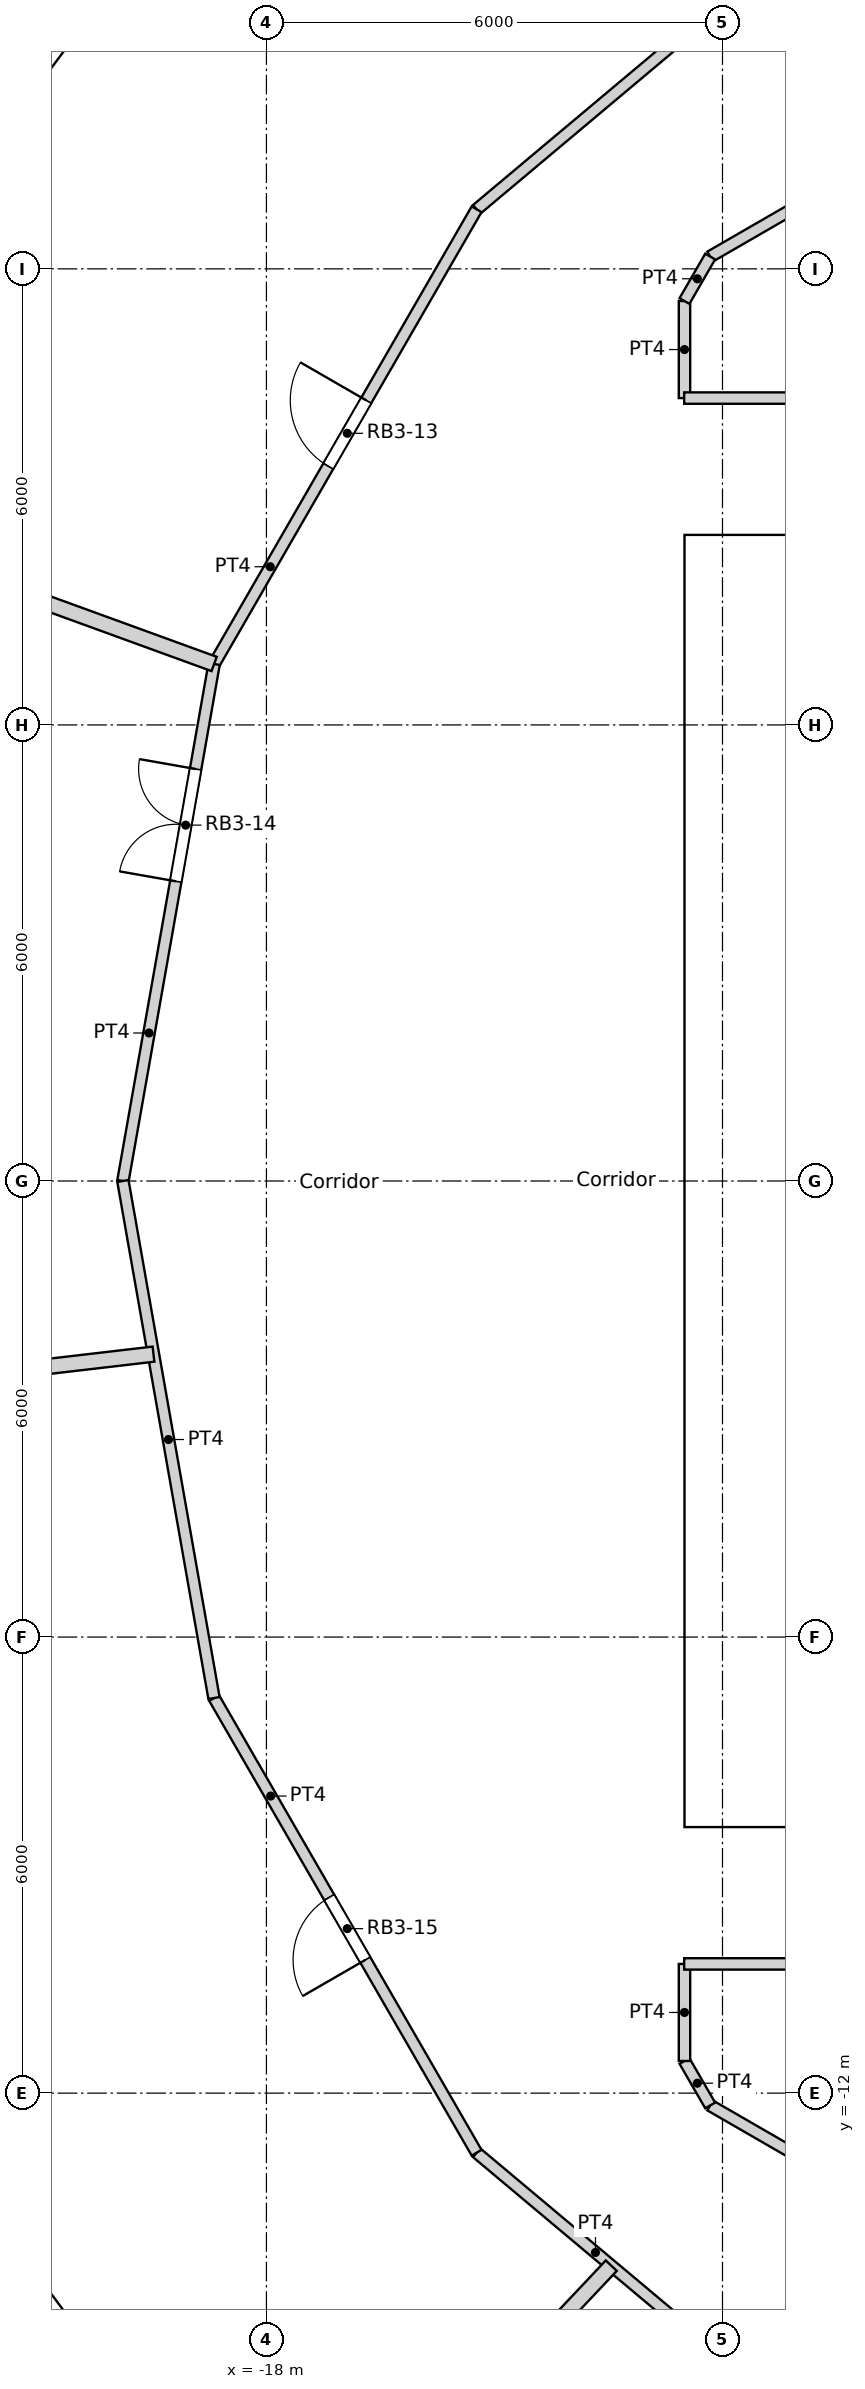
"""IFC4 building model, lengths in metres.
Left out: names, types, materials, properties, quantities, classifications, styles, units other than length and angle.
Written with IfcOpenShell. Run it as: python <this file> out.ifc"""

import sys

from ifc_helpers import new_model, si_unit, direction, frame, frame_2d, origin, origin_2d, place, context, subcontext, project, spatial, rectangle, circle, extrude, element, fill, save


model = new_model("IFC4")
c1 = context("Model", 3, precision=1e-05, world=origin(), true_north=direction((0.0, 1.0)))
c2 = subcontext(c1, "Body", "Model", "MODEL_VIEW")
j1 = project(units=[si_unit("LENGTHUNIT", "METRE"), si_unit("PLANEANGLEUNIT", "RADIAN")], contexts=[c1])
p1 = place(None, origin())
s1 = spatial("IfcSite", under=j1, at=p1, CompositionType="ELEMENT")
p2 = place(p1, origin())
s2 = spatial("IfcBuilding", under=s1, at=p2, CompositionType="ELEMENT")
p3 = place(p2, frame((0.0, 0.0, 147.6)))
s3 = spatial("IfcBuildingStorey", under=s2, at=p3, CompositionType="ELEMENT", Elevation=147.6)
for number, where, z_axis, x_axis in (
    (1, (-20.509, 13.489, 0.0), (0.0, 0.0, 1.0), (1.0, 0.0, 0.0)),
    (2, (-20.509, -13.489, 0.0), (0.0, 0.0, 1.0), (1.0, 0.0, 0.0)),
):
    element("IfcColumn", number, at=place(p3, frame(where, z_axis=z_axis, x_axis=x_axis)), inside=s3, PredefinedType="COLUMN", context=c2, shape_type="SweptSolid", body=[
        extrude(circle(Radius=0.6, at=origin_2d()), origin(), (0.0, 0.0, 1.0), 3.6),
    ])
for number, where, z_axis, x_axis in (
    (3, (-13.798, 12.802, 0.0), (0.0, 0.0, 1.0), (1.0, 0.0, 0.0)),
    (4, (-16.958, 8.167, 0.0), (0.0, 0.0, 1.0), (1.0, 0.0, 0.0)),
    (5, (-18.612, 2.805, 0.0), (0.0, 0.0, 1.0), (1.0, 0.0, 0.0)),
    (6, (-18.612, -2.805, 0.0), (0.0, 0.0, 1.0), (1.0, 0.0, 0.0)),
    (7, (-16.958, -8.167, 0.0), (0.0, 0.0, 1.0), (1.0, 0.0, 0.0)),
    (8, (-13.798, -12.802, 0.0), (0.0, 0.0, 1.0), (1.0, 0.0, 0.0)),
):
    element("IfcColumn", number, at=place(p3, frame(where, z_axis=z_axis, x_axis=x_axis)), inside=s3, PredefinedType="COLUMN", context=c2, shape_type="SweptSolid", body=[
        extrude(circle(Radius=0.65, at=origin_2d()), origin(), (0.0, 0.0, 1.0), 3.6),
    ])
p4 = place(p3, frame((-20.103, 16.836, -0.3), z_axis=(0.0, 0.0, 1.0), x_axis=(-0.597183717734, -0.802104486506, 0.0)))
e9 = element("IfcWall", 9, at=p4, inside=s3, PredefinedType="ELEMENTEDWALL", context=c2, shape_type="SweptSolid", body=[
    extrude(rectangle(XDim=3.0, YDim=1.45, at=frame_2d((1.5, 0.0))), origin(), (0.0, 0.0, 1.0), 3.6),
])
p5 = place(p4, frame((1.5, 0.0, 1.85)))
e10 = element("IfcOpeningElement", 10, at=p5, cuts=e9, PredefinedType="OPENING", context=c2, shape_type="SweptSolid", body=[
    extrude(circle(Radius=0.9, at=origin_2d()), frame((0.0, 0.735, 0.0), z_axis=(0.0, -1.0, 0.0), x_axis=(1.0, 0.0, 0.0)), (0.0, 0.0, 1.0), 1.47),
])
p6 = place(p3, frame((-21.428, -14.094, 0.0), z_axis=(0.0, 0.0, 1.0), x_axis=(0.597197580538, -0.80209416517, 0.0)))
e11 = element("IfcWall", 11, at=p6, inside=s3, PredefinedType="SOLIDWALL", context=c2, shape_type="SweptSolid", body=[
    extrude(rectangle(XDim=2.973, YDim=0.3, at=frame_2d((1.486, 0.0))), origin(), (0.0, 0.0, 1.0), 3.3),
])
p7 = place(p6, frame((1.486, 0.0, 1.55)))
e12 = element("IfcOpeningElement", 12, at=p7, cuts=e11, PredefinedType="OPENING", context=c2, shape_type="SweptSolid", body=[
    extrude(circle(Radius=0.9, at=origin_2d()), frame((0.0, 0.16, 0.0), z_axis=(0.0, -1.0, 0.0), x_axis=(1.0, 0.0, 0.0)), (0.0, 0.0, 1.0), 0.32),
])
p8 = place(p3, frame((-12.5, -8.05, 0.0), z_axis=(0.0, 0.0, 1.0), x_axis=(1.0, 0.0, 0.0)))
e13 = element("IfcWall", 13, at=p8, inside=s3, PredefinedType="SOLIDWALL", context=c2, shape_type="SweptSolid", body=[
    extrude(rectangle(XDim=25.0, YDim=0.9, at=frame_2d((12.5, 0.0))), origin(), (0.0, 0.0, 1.0), 3.6),
])
p9 = place(p8, frame((13.4, 0.0, 0.0)))
e14 = element("IfcOpeningElement", 14, at=p9, cuts=e13, PredefinedType="OPENING", context=c2, shape_type="SweptSolid", body=[
    extrude(rectangle(XDim=1.0, YDim=2.1, at=frame_2d((0.5, 1.05))), frame((0.0, 0.45, 0.0), z_axis=(0.0, -1.0, 0.0), x_axis=(1.0, 0.0, 0.0)), (0.0, 0.0, 1.0), 0.9),
])
p10 = place(p8, frame((8.3, 0.0, 0.0)))
e15 = element("IfcOpeningElement", 15, at=p10, cuts=e13, PredefinedType="OPENING", context=c2, shape_type="SweptSolid", body=[
    extrude(rectangle(XDim=1.8, YDim=2.1, at=frame_2d((0.9, 1.05))), frame((0.0, 0.45, 0.0), z_axis=(0.0, -1.0, 0.0), x_axis=(1.0, 0.0, 0.0)), (0.0, 0.0, 1.0), 0.9),
])
p11 = place(p8, frame((14.9, 0.0, 0.0)))
e16 = element("IfcOpeningElement", 16, at=p11, cuts=e13, PredefinedType="OPENING", context=c2, shape_type="SweptSolid", body=[
    extrude(rectangle(XDim=1.8, YDim=2.1, at=frame_2d((0.9, 1.05))), frame((0.0, 0.45, 0.0), z_axis=(0.0, -1.0, 0.0), x_axis=(1.0, 0.0, 0.0)), (0.0, 0.0, 1.0), 0.9),
])
p12 = place(p3, frame((-12.5, 8.05, 0.0), z_axis=(0.0, 0.0, 1.0), x_axis=(1.0, 0.0, 0.0)))
e17 = element("IfcWall", 17, at=p12, inside=s3, PredefinedType="SOLIDWALL", context=c2, shape_type="SweptSolid", body=[
    extrude(rectangle(XDim=25.0, YDim=0.9, at=frame_2d((12.5, 0.0))), origin(), (0.0, 0.0, 1.0), 3.6),
])
p13 = place(p12, frame((8.3, 0.0, 0.0)))
e18 = element("IfcOpeningElement", 18, at=p13, cuts=e17, PredefinedType="OPENING", context=c2, shape_type="SweptSolid", body=[
    extrude(rectangle(XDim=1.8, YDim=2.1, at=frame_2d((0.9, 1.05))), frame((0.0, 0.45, 0.0), z_axis=(0.0, -1.0, 0.0), x_axis=(1.0, 0.0, 0.0)), (0.0, 0.0, 1.0), 0.9),
])
p14 = place(p3, frame((-12.05, -7.6, 0.0), z_axis=(0.0, 0.0, 1.0), x_axis=(0.0, 1.0, 0.0)))
e19 = element("IfcWall", 19, at=p14, inside=s3, PredefinedType="SOLIDWALL", context=c2, shape_type="SweptSolid", body=[
    extrude(rectangle(XDim=15.2, YDim=0.9, at=frame_2d((7.6, 0.0))), origin(), (0.0, 0.0, 1.0), 3.6),
])
p15 = place(p14, frame((7.1, 0.0, 0.0)))
e20 = element("IfcOpeningElement", 20, at=p15, cuts=e19, PredefinedType="OPENING", context=c2, shape_type="SweptSolid", body=[
    extrude(rectangle(XDim=1.0, YDim=2.1, at=frame_2d((0.5, 1.05))), frame((0.0, 0.45, 0.0), z_axis=(0.0, -1.0, 0.0), x_axis=(1.0, 0.0, 0.0)), (0.0, 0.0, 1.0), 0.9),
])
p16 = place(p3, frame((-11.6, -4.55, 0.0), z_axis=(0.0, 0.0, 1.0), x_axis=(1.0, 0.0, 0.0)))
e21 = element("IfcWall", 21, at=p16, inside=s3, PredefinedType="SOLIDWALL", context=c2, shape_type="SweptSolid", body=[
    extrude(rectangle(XDim=2.4, YDim=0.3, at=frame_2d((1.2, 0.0))), origin(), (0.0, 0.0, 1.0), 3.3),
])
p17 = place(p16, frame((0.65, 0.0, 0.0)))
e22 = element("IfcOpeningElement", 22, at=p17, cuts=e21, PredefinedType="OPENING", context=c2, shape_type="SweptSolid", body=[
    extrude(rectangle(XDim=1.1, YDim=2.1, at=frame_2d((0.55, 1.05))), frame((0.0, 0.15, 0.0), z_axis=(0.0, -1.0, 0.0), x_axis=(1.0, 0.0, 0.0)), (0.0, 0.0, 1.0), 0.3),
])
p18 = place(p3, frame((-11.6, 4.55, 0.0), z_axis=(0.0, 0.0, 1.0), x_axis=(1.0, 0.0, 0.0)))
e23 = element("IfcWall", 23, at=p18, inside=s3, PredefinedType="SOLIDWALL", context=c2, shape_type="SweptSolid", body=[
    extrude(rectangle(XDim=2.4, YDim=0.3, at=frame_2d((1.2, 0.0))), origin(), (0.0, 0.0, 1.0), 3.3),
])
p19 = place(p18, frame((0.65, 0.0, 0.0)))
e24 = element("IfcOpeningElement", 24, at=p19, cuts=e23, PredefinedType="OPENING", context=c2, shape_type="SweptSolid", body=[
    extrude(rectangle(XDim=1.1, YDim=2.1, at=frame_2d((0.55, 1.05))), frame((0.0, 0.15, 0.0), z_axis=(0.0, -1.0, 0.0), x_axis=(1.0, 0.0, 0.0)), (0.0, 0.0, 1.0), 0.3),
])
for number, where, z_axis, x_axis in (
    (25, (-12.504, 10.3, 0.0), (0.0, 0.0, 1.0), (1.0, 0.0, 0.0)),
    (26, (-12.504, -10.3, 0.0), (0.0, 0.0, 1.0), (1.0, 0.0, 0.0)),
):
    element("IfcWall", number, at=place(p3, frame(where, z_axis=z_axis, x_axis=x_axis)), inside=s3, PredefinedType="PARTITIONING", context=c2, shape_type="SweptSolid", body=[
        extrude(rectangle(XDim=7.687, YDim=0.15, at=frame_2d((3.844, 0.0))), origin(), (0.0, 0.0, 1.0), 3.3),
    ])
p20 = place(p3, frame((-12.162, 12.162, 0.0), z_axis=(0.0, 0.0, 1.0), x_axis=(0.866004766557, 0.500035743023, 0.0)))
e27 = element("IfcWall", 27, at=p20, inside=s3, PredefinedType="PARTITIONING", context=c2, shape_type="SweptSolid", body=[
    extrude(rectangle(XDim=8.477, YDim=0.15, at=frame_2d((4.239, 0.0))), origin(), (0.0, 0.0, 1.0), 3.3),
])
p21 = place(p20, frame((3.739, 0.0, 0.0)))
e28 = element("IfcOpeningElement", 28, at=p21, cuts=e27, PredefinedType="OPENING", context=c2, shape_type="SweptSolid", body=[
    extrude(rectangle(XDim=1.0, YDim=2.04, at=frame_2d((0.5, 1.02))), frame((0.0, 0.075, 0.0), z_axis=(0.0, -1.0, 0.0), x_axis=(1.0, 0.0, 0.0)), (0.0, 0.0, 1.0), 0.15),
])
p22 = place(p3, frame((-15.234, 12.783, 0.0), z_axis=(0.0, 0.0, 1.0), x_axis=(0.765936018543, 0.642916802937, 0.0)))
e29 = element("IfcWall", 29, at=p22, inside=s3, PredefinedType="PARTITIONING", context=c2, shape_type="SweptSolid", body=[
    extrude(rectangle(XDim=6.906, YDim=0.15, at=frame_2d((3.453, 0.0))), origin(), (0.0, 0.0, 1.0), 3.3),
])
p23 = place(p3, frame((-12.5, 11.577, 0.0), z_axis=(0.0, 0.0, 1.0), x_axis=(0.500024767483, 0.866011103799, 0.0)))
e30 = element("IfcWall", 30, at=p23, inside=s3, PredefinedType="PARTITIONING", context=c2, shape_type="SweptSolid", body=[
    extrude(rectangle(XDim=0.676, YDim=0.15, at=frame_2d((0.338, 0.0))), origin(), (0.0, 0.0, 1.0), 3.3),
])
for number, where, z_axis, x_axis in (
    (31, (-12.5, 10.3, 0.0), (0.0, 0.0, 1.0), (0.0, 1.0, 0.0)),
    (32, (-12.5, -11.577, 0.0), (0.0, 0.0, 1.0), (0.0, 1.0, 0.0)),
):
    element("IfcWall", number, at=place(p3, frame(where, z_axis=z_axis, x_axis=x_axis)), inside=s3, PredefinedType="PARTITIONING", context=c2, shape_type="SweptSolid", body=[
        extrude(rectangle(XDim=1.277, YDim=0.15, at=frame_2d((0.638, 0.0))), origin(), (0.0, 0.0, 1.0), 3.3),
    ])
p24 = place(p3, frame((-12.5, -11.577, 0.0), z_axis=(0.0, 0.0, 1.0), x_axis=(0.500024767483, -0.866011103799, 0.0)))
e33 = element("IfcWall", 33, at=p24, inside=s3, PredefinedType="PARTITIONING", context=c2, shape_type="SweptSolid", body=[
    extrude(rectangle(XDim=0.676, YDim=0.15, at=frame_2d((0.338, 0.0))), origin(), (0.0, 0.0, 1.0), 3.3),
])
p25 = place(p3, frame((-18.688, 6.802, 0.0), z_axis=(0.0, 0.0, 1.0), x_axis=(0.499914202267, 0.866074933462, 0.0)))
e34 = element("IfcWall", 34, at=p25, inside=s3, PredefinedType="PARTITIONING", context=c2, shape_type="SweptSolid", body=[
    extrude(rectangle(XDim=6.907, YDim=0.15, at=frame_2d((3.454, 0.0))), origin(), (0.0, 0.0, 1.0), 3.3),
])
p26 = place(p25, frame((3.004, 0.0, 0.0)))
e35 = element("IfcOpeningElement", 35, at=p26, cuts=e34, PredefinedType="OPENING", context=c2, shape_type="SweptSolid", body=[
    extrude(rectangle(XDim=1.0, YDim=2.04, at=frame_2d((0.5, 1.02))), frame((0.0, 0.075, 0.0), z_axis=(0.0, -1.0, 0.0), x_axis=(1.0, 0.0, 0.0)), (0.0, 0.0, 1.0), 0.15),
])
p27 = place(p3, frame((-19.888, 0.0, 0.0), z_axis=(0.0, 0.0, 1.0), x_axis=(0.173482860149, -0.984836888644, 0.0)))
e36 = element("IfcWall", 36, at=p27, inside=s3, PredefinedType="PARTITIONING", context=c2, shape_type="SweptSolid", body=[
    extrude(rectangle(XDim=6.907, YDim=0.15, at=frame_2d((3.454, 0.0))), origin(), (0.0, 0.0, 1.0), 3.3),
])
p28 = place(p3, frame((-19.888, 0.0, 0.0), z_axis=(0.0, 0.0, 1.0), x_axis=(0.173728873845, 0.98479352069, 0.0)))
e37 = element("IfcWall", 37, at=p28, inside=s3, PredefinedType="PARTITIONING", context=c2, shape_type="SweptSolid", body=[
    extrude(rectangle(XDim=6.907, YDim=0.15, at=frame_2d((3.454, 0.0))), origin(), (0.0, 0.0, 1.0), 3.3),
])
p29 = place(p28, frame((4.004, 0.0, 0.0)))
e38 = element("IfcOpeningElement", 38, at=p29, cuts=e37, PredefinedType="OPENING", context=c2, shape_type="SweptSolid", body=[
    extrude(rectangle(XDim=1.5, YDim=2.1, at=frame_2d((0.75, 1.05))), frame((0.0, 0.075, 0.0), z_axis=(0.0, -1.0, 0.0), x_axis=(1.0, 0.0, 0.0)), (0.0, 0.0, 1.0), 0.15),
])
p30 = place(p3, frame((-15.235, -12.784, 0.0), z_axis=(0.0, 0.0, 1.0), x_axis=(0.766192104565, -0.642611592567, 0.0)))
e39 = element("IfcWall", 39, at=p30, inside=s3, PredefinedType="PARTITIONING", context=c2, shape_type="SweptSolid", body=[
    extrude(rectangle(XDim=6.906, YDim=0.15, at=frame_2d((3.453, 0.0))), origin(), (0.0, 0.0, 1.0), 3.3),
])
p31 = place(p30, frame((4.133, 0.0, 0.0)))
e40 = element("IfcOpeningElement", 40, at=p31, cuts=e39, PredefinedType="OPENING", context=c2, shape_type="SweptSolid", body=[
    extrude(rectangle(XDim=0.95, YDim=2.1, at=frame_2d((0.475, 1.05))), frame((0.0, 0.075, 0.0), z_axis=(0.0, -1.0, 0.0), x_axis=(1.0, 0.0, 0.0)), (0.0, 0.0, 1.0), 0.15),
])
p32 = place(p3, frame((-18.688, -6.802, 0.0), z_axis=(0.0, 0.0, 1.0), x_axis=(0.499914202267, -0.866074933462, 0.0)))
e41 = element("IfcWall", 41, at=p32, inside=s3, PredefinedType="PARTITIONING", context=c2, shape_type="SweptSolid", body=[
    extrude(rectangle(XDim=6.907, YDim=0.15, at=frame_2d((3.454, 0.0))), origin(), (0.0, 0.0, 1.0), 3.3),
])
p33 = place(p32, frame((3.028, 0.0, 0.0)))
e42 = element("IfcOpeningElement", 42, at=p33, cuts=e41, PredefinedType="OPENING", context=c2, shape_type="SweptSolid", body=[
    extrude(rectangle(XDim=0.95, YDim=2.1, at=frame_2d((0.475, 1.05))), frame((0.0, 0.075, 0.0), z_axis=(0.0, -1.0, 0.0), x_axis=(1.0, 0.0, 0.0)), (0.0, 0.0, 1.0), 0.15),
])
p34 = place(p3, frame((-12.162, -12.162, 0.0), z_axis=(0.0, 0.0, 1.0), x_axis=(0.866004766557, -0.500035743023, 0.0)))
e43 = element("IfcWall", 43, at=p34, inside=s3, PredefinedType="PARTITIONING", context=c2, shape_type="SweptSolid", body=[
    extrude(rectangle(XDim=8.477, YDim=0.15, at=frame_2d((4.239, 0.0))), origin(), (0.0, 0.0, 1.0), 3.3),
])
p35 = place(p34, frame((3.738, 0.0, 0.0)))
e44 = element("IfcOpeningElement", 44, at=p35, cuts=e43, PredefinedType="OPENING", context=c2, shape_type="SweptSolid", body=[
    extrude(rectangle(XDim=1.0, YDim=2.04, at=frame_2d((0.5, 1.02))), frame((0.0, 0.075, 0.0), z_axis=(0.0, -1.0, 0.0), x_axis=(1.0, 0.0, 0.0)), (0.0, 0.0, 1.0), 0.15),
])
p36 = place(p3, frame((-23.96, 8.721, 0.0), z_axis=(0.0, 0.0, 1.0), x_axis=(0.939686652043, -0.342036541866, 0.0)))
e45 = element("IfcWall", 45, at=p36, inside=s3, PredefinedType="PARTITIONING", context=c2, shape_type="SweptSolid", body=[
    extrude(rectangle(XDim=5.61, YDim=0.2, at=frame_2d((2.805, 0.0))), origin(), (0.0, 0.0, 1.0), 3.3),
])
for number, where, z_axis, x_axis in (
    (46, (-25.325, -2.96, 0.0), (0.0, 0.0, 1.0), (0.993, 0.116, 0.0)),
    (47, (-17.497, -18.546, 0.0), (0.0, 0.0, 1.0), (0.686, 0.727, 0.0)),
):
    element("IfcWall", number, at=place(p3, frame(where, z_axis=z_axis, x_axis=x_axis)), inside=s3, PredefinedType="PARTITIONING", context=c2, shape_type="SweptSolid", body=[
        extrude(rectangle(XDim=5.879, YDim=0.2, at=frame_2d((2.939, 0.0))), origin(), (0.0, 0.0, 1.0), 3.3),
    ])
p37 = place(p5, origin())
e48 = element("IfcWindow", 48, at=p37, inside=s3, PartitioningType="SINGLE_PANEL", PredefinedType="WINDOW", context=c2, shape_type="SweptSolid", body=[
    extrude(circle(Radius=0.9, at=origin_2d()), frame((0.0, 0.695, 0.0), z_axis=(0.0, -1.0, 0.0), x_axis=(1.0, 0.0, 0.0)), (0.0, 0.0, 1.0), 0.1),
])
fill(e10, e48)
p38 = place(p7, origin())
e49 = element("IfcWindow", 49, at=p38, inside=s3, PartitioningType="SINGLE_PANEL", PredefinedType="WINDOW", context=c2, shape_type="SweptSolid", body=[
    extrude(circle(Radius=0.9, at=origin_2d()), frame((0.0, 0.12, 0.0), z_axis=(0.0, -1.0, 0.0), x_axis=(1.0, 0.0, 0.0)), (0.0, 0.0, 1.0), 0.1),
])
fill(e12, e49)
p39 = place(p15, origin())
e50 = element("IfcDoor", 50, at=p39, inside=s3, OperationType="DOUBLE_DOOR_SINGLE_SWING", PredefinedType="DOOR", context=c2, shape_type="SweptSolid", body=[
    extrude(rectangle(XDim=1.0, YDim=2.1, at=frame_2d((0.5, 1.05))), frame((0.0, 0.025, 0.0), z_axis=(0.0, -1.0, 0.0), x_axis=(1.0, 0.0, 0.0)), (0.0, 0.0, 1.0), 0.05),
])
fill(e20, e50)
p40 = place(p26, origin())
e51 = element("IfcDoor", 51, at=p40, inside=s3, OperationType="SINGLE_SWING_RIGHT", PredefinedType="DOOR", context=c2, shape_type="SweptSolid", body=[
    extrude(rectangle(XDim=1.0, YDim=2.04, at=frame_2d((0.5, 1.02))), frame((0.0, 0.025, 0.0), z_axis=(0.0, -1.0, 0.0), x_axis=(1.0, 0.0, 0.0)), (0.0, 0.0, 1.0), 0.05),
])
fill(e35, e51)
p41 = place(p29, origin())
e52 = element("IfcDoor", 52, at=p41, inside=s3, OperationType="DOUBLE_DOOR_SINGLE_SWING", PredefinedType="DOOR", context=c2, shape_type="SweptSolid", body=[
    extrude(rectangle(XDim=1.5, YDim=2.1, at=frame_2d((0.75, 1.05))), frame((0.0, 0.025, 0.0), z_axis=(0.0, -1.0, 0.0), x_axis=(1.0, 0.0, 0.0)), (0.0, 0.0, 1.0), 0.05),
])
fill(e38, e52)
p42 = place(p33, origin())
e53 = element("IfcDoor", 53, at=p42, inside=s3, OperationType="SINGLE_SWING_LEFT", PredefinedType="DOOR", context=c2, shape_type="SweptSolid", body=[
    extrude(rectangle(XDim=0.95, YDim=2.1, at=frame_2d((0.475, 1.05))), frame((0.0, 0.025, 0.0), z_axis=(0.0, -1.0, 0.0), x_axis=(1.0, 0.0, 0.0)), (0.0, 0.0, 1.0), 0.05),
])
fill(e42, e53)
save(model, sys.argv[1])
